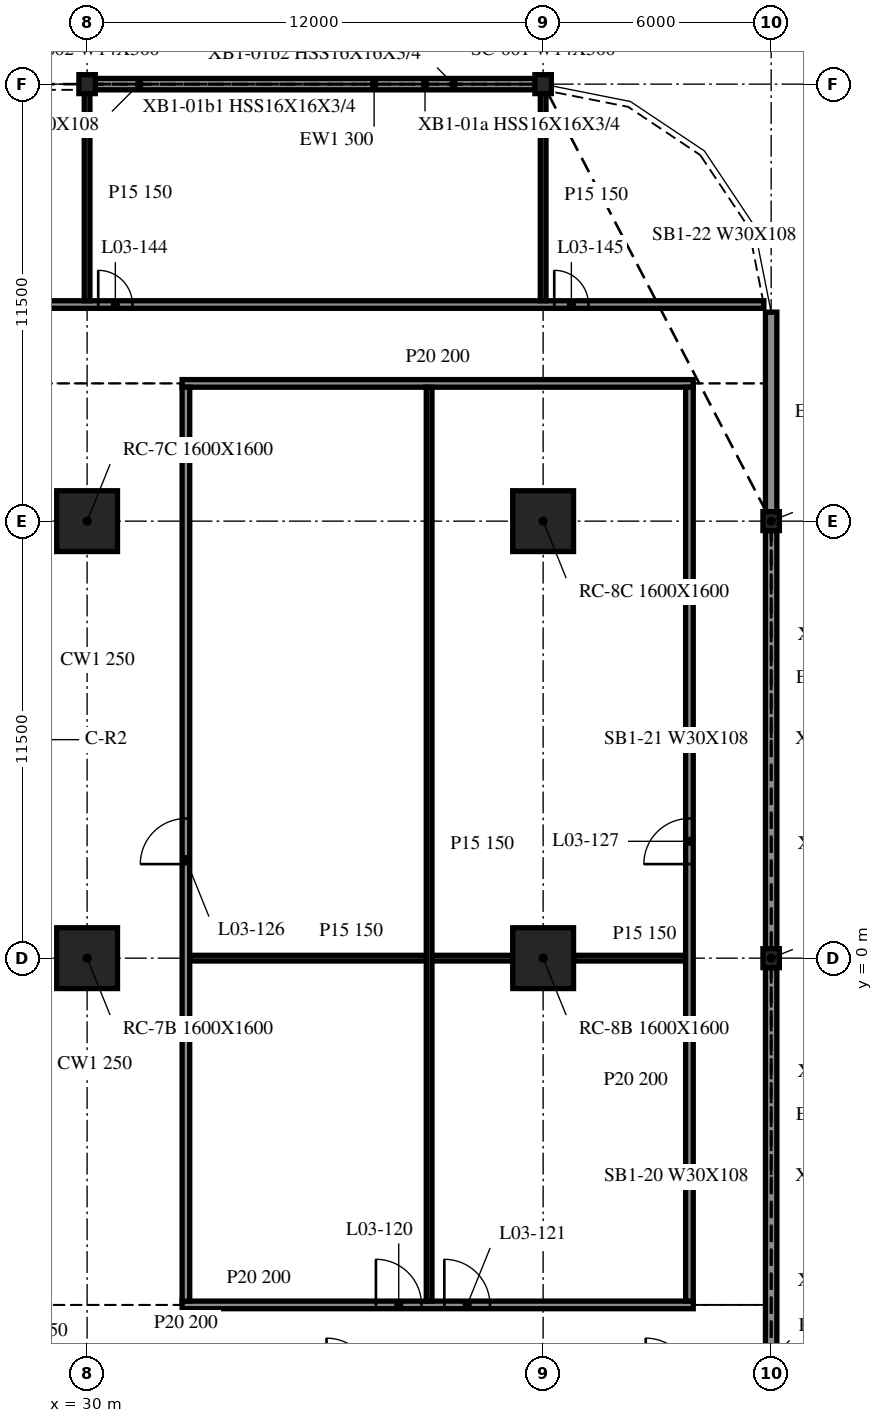
"""IFC4 building model, lengths in metres.
Left out: names, types, materials, properties, quantities, classifications, styles, units other than length and angle.
Written with IfcOpenShell. Run it as: python <this file> out.ifc"""

import sys

from ifc_helpers import new_model, si_unit, direction, frame, frame_2d, origin, origin_2d, place, context, subcontext, project, spatial, rectangle, i_section, extrude, element, fill, save


model = new_model("IFC4")
c1 = context("Model", 3, precision=1e-05, world=origin(), true_north=direction((0.0, 1.0)))
c2 = subcontext(c1, "Body", "Model", "MODEL_VIEW")
j1 = project(units=[si_unit("LENGTHUNIT", "METRE"), si_unit("PLANEANGLEUNIT", "RADIAN")], contexts=[c1])
p1 = place(None, origin())
s1 = spatial("IfcSite", under=j1, at=p1, CompositionType="ELEMENT")
p2 = place(p1, origin())
s2 = spatial("IfcBuilding", under=s1, at=p2, CompositionType="ELEMENT")
p3 = place(p2, frame((0.0, 0.0, 15.8)))
s3 = spatial("IfcBuildingStorey", under=s2, at=p3, CompositionType="ELEMENT", Elevation=15.8)
for number, where, z_axis, x_axis in (
    (1, (30.0, 0.0, -0.34), (0.0, 0.0, 1.0), (1.0, 0.0, 0.0)),
    (2, (30.0, 11.5, -0.34), (0.0, 0.0, 1.0), (1.0, 0.0, 0.0)),
    (3, (42.0, 0.0, -0.34), (0.0, 0.0, 1.0), (1.0, 0.0, 0.0)),
    (4, (42.0, 11.5, -0.34), (0.0, 0.0, 1.0), (1.0, 0.0, 0.0)),
):
    element("IfcColumn", number, at=place(p3, frame(where, z_axis=z_axis, x_axis=x_axis)), inside=s3, PredefinedType="COLUMN", context=c2, shape_type="SweptSolid", body=[
        extrude(rectangle(XDim=1.6, YDim=1.6, at=origin_2d()), origin(), (0.0, 0.0, 1.0), 4.3),
    ])
for number, where, z_axis, x_axis in (
    (5, (42.0, 23.0, -0.34), (0.0, 0.0, 1.0), (1.0, 0.0, 0.0)),
    (6, (30.0, 23.0, -0.34), (0.0, 0.0, 1.0), (1.0, 0.0, 0.0)),
    (7, (48.0, 0.0, -0.34), (0.0, 0.0, 1.0), (1.0, 0.0, 0.0)),
    (8, (48.0, 11.5, -0.34), (0.0, 0.0, 1.0), (1.0, 0.0, 0.0)),
):
    element("IfcColumn", number, at=place(p3, frame(where, z_axis=z_axis, x_axis=x_axis)), inside=s3, PredefinedType="COLUMN", context=c2, shape_type="SweptSolid", body=[
        extrude(i_section(OverallWidth=0.432, OverallDepth=0.498, WebThickness=0.056, FlangeThickness=0.089, at=origin_2d()), origin(), (0.0, 0.0, 1.0), 4.3),
    ])
p4 = place(p3, frame((41.972, 23.0, 0.0), z_axis=(0.0, 0.0, 1.0), x_axis=(-1.0, 0.0, 0.0)))
e9 = element("IfcWall", 9, at=p4, inside=s3, PredefinedType="NOTDEFINED", context=c2, shape_type="SweptSolid", body=[
    extrude(rectangle(XDim=11.944, YDim=0.3, at=frame_2d((5.972, 0.0))), origin(), (0.0, 0.0, 1.0), 3.203),
])
for number, where, z_axis, x_axis in (
    (10, (48.0, -11.251, 0.0), (0.0, 0.0, 1.0), (0.0, 1.0, 0.0)),
    (11, (48.0, 0.249, 0.0), (0.0, 0.0, 1.0), (0.0, 1.0, 0.0)),
):
    element("IfcWall", number, at=place(p3, frame(where, z_axis=z_axis, x_axis=x_axis)), inside=s3, PredefinedType="NOTDEFINED", context=c2, shape_type="SweptSolid", body=[
        extrude(rectangle(XDim=11.002, YDim=0.3, at=frame_2d((5.501, 0.0))), origin(), (0.0, 0.0, 1.0), 3.203),
    ])
p5 = place(p3, frame((48.0, 11.749, 0.0), z_axis=(0.0, 0.0, 1.0), x_axis=(0.0, 1.0, 0.0)))
e12 = element("IfcWall", 12, at=p5, inside=s3, PredefinedType="NOTDEFINED", context=c2, shape_type="SweptSolid", body=[
    extrude(rectangle(XDim=5.251, YDim=0.3, at=frame_2d((2.625, 0.0))), origin(), (0.0, 0.0, 1.0), 3.203),
])
p6 = place(p3, frame((32.5, -9.125, 0.0), z_axis=(0.0, 0.0, 1.0), x_axis=(1.0, 0.0, 0.0)))
e13 = element("IfcWall", 13, at=p6, inside=s3, PredefinedType="PARTITIONING", context=c2, shape_type="SweptSolid", body=[
    extrude(rectangle(XDim=13.45, YDim=0.2, at=frame_2d((6.725, 0.0))), origin(), (0.0, 0.0, 1.0), 3.96),
])
p7 = place(p6, frame((5.1, 0.0, 0.0)))
e14 = element("IfcOpeningElement", 14, at=p7, cuts=e13, PredefinedType="OPENING", context=c2, shape_type="SweptSolid", body=[
    extrude(rectangle(XDim=1.2, YDim=2.1, at=frame_2d((0.6, 1.05))), frame((0.0, 0.11, 0.0), z_axis=(0.0, -1.0, 0.0), x_axis=(1.0, 0.0, 0.0)), (0.0, 0.0, 1.0), 0.22),
])
p8 = place(p6, frame((6.9, 0.0, 0.0)))
e15 = element("IfcOpeningElement", 15, at=p8, cuts=e13, PredefinedType="OPENING", context=c2, shape_type="SweptSolid", body=[
    extrude(rectangle(XDim=1.2, YDim=2.1, at=frame_2d((0.6, 1.05))), frame((0.0, 0.11, 0.0), z_axis=(0.0, -1.0, 0.0), x_axis=(1.0, 0.0, 0.0)), (0.0, 0.0, 1.0), 0.22),
])
p9 = place(p3, frame((32.7, 0.0, 0.0), z_axis=(0.0, 0.0, 1.0), x_axis=(1.0, 0.0, 0.0)))
e16 = element("IfcWall", 16, at=p9, inside=s3, PredefinedType="PARTITIONING", context=c2, shape_type="SweptSolid", body=[
    extrude(rectangle(XDim=8.5, YDim=0.15, at=frame_2d((4.25, 0.0))), origin(), (0.0, 0.0, 1.0), 3.96),
])
p10 = place(p3, frame((42.8, 0.0, 0.0), z_axis=(0.0, 0.0, 1.0), x_axis=(1.0, 0.0, 0.0)))
e17 = element("IfcWall", 17, at=p10, inside=s3, PredefinedType="PARTITIONING", context=c2, shape_type="SweptSolid", body=[
    extrude(rectangle(XDim=2.95, YDim=0.15, at=frame_2d((1.475, 0.0))), origin(), (0.0, 0.0, 1.0), 3.96),
])
p11 = place(p3, frame((32.5, 15.125, 0.0), z_axis=(0.0, 0.0, 1.0), x_axis=(1.0, 0.0, 0.0)))
e18 = element("IfcWall", 18, at=p11, inside=s3, PredefinedType="PARTITIONING", context=c2, shape_type="SweptSolid", body=[
    extrude(rectangle(XDim=13.45, YDim=0.2, at=frame_2d((6.725, 0.0))), origin(), (0.0, 0.0, 1.0), 3.96),
])
p12 = place(p3, frame((-47.807, 17.2, 0.0), z_axis=(0.0, 0.0, 1.0), x_axis=(1.0, 0.0, 0.0)))
e19 = element("IfcWall", 19, at=p12, inside=s3, PredefinedType="PARTITIONING", context=c2, shape_type="SweptSolid", body=[
    extrude(rectangle(XDim=95.615, YDim=0.2, at=frame_2d((47.807, 0.0))), origin(), (0.0, 0.0, 1.0), 3.96),
])
p13 = place(p12, frame((4.7, 0.0, 0.0)))
e20 = element("IfcOpeningElement", 20, at=p13, cuts=e19, PredefinedType="OPENING", context=c2, shape_type="SweptSolid", body=[
    extrude(rectangle(XDim=0.9, YDim=2.1, at=frame_2d((0.45, 1.05))), frame((0.0, 0.11, 0.0), z_axis=(0.0, -1.0, 0.0), x_axis=(1.0, 0.0, 0.0)), (0.0, 0.0, 1.0), 0.22),
])
p14 = place(p12, frame((16.7, 0.0, 0.0)))
e21 = element("IfcOpeningElement", 21, at=p14, cuts=e19, PredefinedType="OPENING", context=c2, shape_type="SweptSolid", body=[
    extrude(rectangle(XDim=0.9, YDim=2.1, at=frame_2d((0.45, 1.05))), frame((0.0, 0.11, 0.0), z_axis=(0.0, -1.0, 0.0), x_axis=(1.0, 0.0, 0.0)), (0.0, 0.0, 1.0), 0.22),
])
p15 = place(p12, frame((20.1, 0.0, 0.0)))
e22 = element("IfcOpeningElement", 22, at=p15, cuts=e19, PredefinedType="OPENING", context=c2, shape_type="SweptSolid", body=[
    extrude(rectangle(XDim=0.9, YDim=2.1, at=frame_2d((0.45, 1.05))), frame((0.0, 0.11, 0.0), z_axis=(0.0, -1.0, 0.0), x_axis=(1.0, 0.0, 0.0)), (0.0, 0.0, 1.0), 0.22),
])
p16 = place(p12, frame((22.7, 0.0, 0.0)))
e23 = element("IfcOpeningElement", 23, at=p16, cuts=e19, PredefinedType="OPENING", context=c2, shape_type="SweptSolid", body=[
    extrude(rectangle(XDim=0.9, YDim=2.1, at=frame_2d((0.45, 1.05))), frame((0.0, 0.11, 0.0), z_axis=(0.0, -1.0, 0.0), x_axis=(1.0, 0.0, 0.0)), (0.0, 0.0, 1.0), 0.22),
])
p17 = place(p12, frame((28.7, 0.0, 0.0)))
e24 = element("IfcOpeningElement", 24, at=p17, cuts=e19, PredefinedType="OPENING", context=c2, shape_type="SweptSolid", body=[
    extrude(rectangle(XDim=0.9, YDim=2.1, at=frame_2d((0.45, 1.05))), frame((0.0, 0.11, 0.0), z_axis=(0.0, -1.0, 0.0), x_axis=(1.0, 0.0, 0.0)), (0.0, 0.0, 1.0), 0.22),
])
p18 = place(p12, frame((40.7, 0.0, 0.0)))
e25 = element("IfcOpeningElement", 25, at=p18, cuts=e19, PredefinedType="OPENING", context=c2, shape_type="SweptSolid", body=[
    extrude(rectangle(XDim=0.9, YDim=2.1, at=frame_2d((0.45, 1.05))), frame((0.0, 0.11, 0.0), z_axis=(0.0, -1.0, 0.0), x_axis=(1.0, 0.0, 0.0)), (0.0, 0.0, 1.0), 0.22),
])
p19 = place(p12, frame((44.1, 0.0, 0.0)))
e26 = element("IfcOpeningElement", 26, at=p19, cuts=e19, PredefinedType="OPENING", context=c2, shape_type="SweptSolid", body=[
    extrude(rectangle(XDim=0.9, YDim=2.1, at=frame_2d((0.45, 1.05))), frame((0.0, 0.11, 0.0), z_axis=(0.0, -1.0, 0.0), x_axis=(1.0, 0.0, 0.0)), (0.0, 0.0, 1.0), 0.22),
])
p20 = place(p12, frame((46.7, 0.0, 0.0)))
e27 = element("IfcOpeningElement", 27, at=p20, cuts=e19, PredefinedType="OPENING", context=c2, shape_type="SweptSolid", body=[
    extrude(rectangle(XDim=0.9, YDim=2.1, at=frame_2d((0.45, 1.05))), frame((0.0, 0.11, 0.0), z_axis=(0.0, -1.0, 0.0), x_axis=(1.0, 0.0, 0.0)), (0.0, 0.0, 1.0), 0.22),
])
p21 = place(p12, frame((48.1, 0.0, 0.0)))
e28 = element("IfcOpeningElement", 28, at=p21, cuts=e19, PredefinedType="OPENING", context=c2, shape_type="SweptSolid", body=[
    extrude(rectangle(XDim=0.9, YDim=2.1, at=frame_2d((0.45, 1.05))), frame((0.0, 0.11, 0.0), z_axis=(0.0, -1.0, 0.0), x_axis=(1.0, 0.0, 0.0)), (0.0, 0.0, 1.0), 0.22),
])
p22 = place(p12, frame((54.1, 0.0, 0.0)))
e29 = element("IfcOpeningElement", 29, at=p22, cuts=e19, PredefinedType="OPENING", context=c2, shape_type="SweptSolid", body=[
    extrude(rectangle(XDim=0.9, YDim=2.1, at=frame_2d((0.45, 1.05))), frame((0.0, 0.11, 0.0), z_axis=(0.0, -1.0, 0.0), x_axis=(1.0, 0.0, 0.0)), (0.0, 0.0, 1.0), 0.22),
])
p23 = place(p12, frame((66.1, 0.0, 0.0)))
e30 = element("IfcOpeningElement", 30, at=p23, cuts=e19, PredefinedType="OPENING", context=c2, shape_type="SweptSolid", body=[
    extrude(rectangle(XDim=0.9, YDim=2.1, at=frame_2d((0.45, 1.05))), frame((0.0, 0.11, 0.0), z_axis=(0.0, -1.0, 0.0), x_axis=(1.0, 0.0, 0.0)), (0.0, 0.0, 1.0), 0.22),
])
p24 = place(p12, frame((69.5, 0.0, 0.0)))
e31 = element("IfcOpeningElement", 31, at=p24, cuts=e19, PredefinedType="OPENING", context=c2, shape_type="SweptSolid", body=[
    extrude(rectangle(XDim=0.9, YDim=2.1, at=frame_2d((0.45, 1.05))), frame((0.0, 0.11, 0.0), z_axis=(0.0, -1.0, 0.0), x_axis=(1.0, 0.0, 0.0)), (0.0, 0.0, 1.0), 0.22),
])
p25 = place(p12, frame((72.1, 0.0, 0.0)))
e32 = element("IfcOpeningElement", 32, at=p25, cuts=e19, PredefinedType="OPENING", context=c2, shape_type="SweptSolid", body=[
    extrude(rectangle(XDim=0.9, YDim=2.1, at=frame_2d((0.45, 1.05))), frame((0.0, 0.11, 0.0), z_axis=(0.0, -1.0, 0.0), x_axis=(1.0, 0.0, 0.0)), (0.0, 0.0, 1.0), 0.22),
])
p26 = place(p12, frame((78.1, 0.0, 0.0)))
e33 = element("IfcOpeningElement", 33, at=p26, cuts=e19, PredefinedType="OPENING", context=c2, shape_type="SweptSolid", body=[
    extrude(rectangle(XDim=0.9, YDim=2.1, at=frame_2d((0.45, 1.05))), frame((0.0, 0.11, 0.0), z_axis=(0.0, -1.0, 0.0), x_axis=(1.0, 0.0, 0.0)), (0.0, 0.0, 1.0), 0.22),
])
p27 = place(p12, frame((90.1, 0.0, 0.0)))
e34 = element("IfcOpeningElement", 34, at=p27, cuts=e19, PredefinedType="OPENING", context=c2, shape_type="SweptSolid", body=[
    extrude(rectangle(XDim=0.9, YDim=2.1, at=frame_2d((0.45, 1.05))), frame((0.0, 0.11, 0.0), z_axis=(0.0, -1.0, 0.0), x_axis=(1.0, 0.0, 0.0)), (0.0, 0.0, 1.0), 0.22),
])
p28 = place(p3, frame((30.0, 17.3, 0.0), z_axis=(0.0, 0.0, 1.0), x_axis=(0.0, 1.0, 0.0)))
e35 = element("IfcWall", 35, at=p28, inside=s3, PredefinedType="PARTITIONING", context=c2, shape_type="SweptSolid", body=[
    extrude(rectangle(XDim=5.675, YDim=0.15, at=frame_2d((2.837, 0.0))), origin(), (0.0, 0.0, 1.0), 3.96),
])
p29 = place(p3, frame((32.6, -9.025, 0.0), z_axis=(0.0, 0.0, 1.0), x_axis=(0.0, 1.0, 0.0)))
e36 = element("IfcWall", 36, at=p29, inside=s3, PredefinedType="PARTITIONING", context=c2, shape_type="SweptSolid", body=[
    extrude(rectangle(XDim=24.05, YDim=0.2, at=frame_2d((12.025, 0.0))), origin(), (0.0, 0.0, 1.0), 3.96),
])
p30 = place(p29, frame((11.5, 0.0, 0.0)))
e37 = element("IfcOpeningElement", 37, at=p30, cuts=e36, PredefinedType="OPENING", context=c2, shape_type="SweptSolid", body=[
    extrude(rectangle(XDim=1.2, YDim=2.1, at=frame_2d((0.6, 1.05))), frame((0.0, 0.11, 0.0), z_axis=(0.0, -1.0, 0.0), x_axis=(1.0, 0.0, 0.0)), (0.0, 0.0, 1.0), 0.22),
])
p31 = place(p3, frame((39.0, -9.025, 0.0), z_axis=(0.0, 0.0, 1.0), x_axis=(0.0, 1.0, 0.0)))
e38 = element("IfcWall", 38, at=p31, inside=s3, PredefinedType="PARTITIONING", context=c2, shape_type="SweptSolid", body=[
    extrude(rectangle(XDim=24.05, YDim=0.15, at=frame_2d((12.025, 0.0))), origin(), (0.0, 0.0, 1.0), 3.96),
])
p32 = place(p3, frame((42.0, 17.3, 0.0), z_axis=(0.0, 0.0, 1.0), x_axis=(0.0, 1.0, 0.0)))
e39 = element("IfcWall", 39, at=p32, inside=s3, PredefinedType="PARTITIONING", context=c2, shape_type="SweptSolid", body=[
    extrude(rectangle(XDim=5.547, YDim=0.15, at=frame_2d((2.773, 0.0))), origin(), (0.0, 0.0, 1.0), 3.96),
])
p33 = place(p3, frame((45.85, -9.025, 0.0), z_axis=(0.0, 0.0, 1.0), x_axis=(0.0, 1.0, 0.0)))
e40 = element("IfcWall", 40, at=p33, inside=s3, PredefinedType="PARTITIONING", context=c2, shape_type="SweptSolid", body=[
    extrude(rectangle(XDim=24.05, YDim=0.2, at=frame_2d((12.025, 0.0))), origin(), (0.0, 0.0, 1.0), 3.96),
])
p34 = place(p33, frame((11.5, 0.0, 0.0)))
e41 = element("IfcOpeningElement", 41, at=p34, cuts=e40, PredefinedType="OPENING", context=c2, shape_type="SweptSolid", body=[
    extrude(rectangle(XDim=1.2, YDim=2.1, at=frame_2d((0.6, 1.05))), frame((0.0, 0.11, 0.0), z_axis=(0.0, -1.0, 0.0), x_axis=(1.0, 0.0, 0.0)), (0.0, 0.0, 1.0), 0.22),
])
p35 = place(p7, origin())
e42 = element("IfcDoor", 42, at=p35, inside=s3, OperationType="SINGLE_SWING_LEFT", PredefinedType="DOOR", context=c2, shape_type="SweptSolid", body=[
    extrude(rectangle(XDim=1.2, YDim=2.1, at=frame_2d((0.6, 1.05))), frame((0.0, 0.025, 0.0), z_axis=(0.0, -1.0, 0.0), x_axis=(1.0, 0.0, 0.0)), (0.0, 0.0, 1.0), 0.05),
])
fill(e14, e42)
p36 = place(p8, origin())
e43 = element("IfcDoor", 43, at=p36, inside=s3, OperationType="SINGLE_SWING_RIGHT", PredefinedType="DOOR", context=c2, shape_type="SweptSolid", body=[
    extrude(rectangle(XDim=1.2, YDim=2.1, at=frame_2d((0.6, 1.05))), frame((0.0, 0.025, 0.0), z_axis=(0.0, -1.0, 0.0), x_axis=(1.0, 0.0, 0.0)), (0.0, 0.0, 1.0), 0.05),
])
fill(e15, e43)
p37 = place(p30, origin())
e44 = element("IfcDoor", 44, at=p37, inside=s3, OperationType="SINGLE_SWING_LEFT", PredefinedType="DOOR", context=c2, shape_type="SweptSolid", body=[
    extrude(rectangle(XDim=1.2, YDim=2.1, at=frame_2d((0.6, 1.05))), frame((0.0, 0.025, 0.0), z_axis=(0.0, -1.0, 0.0), x_axis=(1.0, 0.0, 0.0)), (0.0, 0.0, 1.0), 0.05),
])
fill(e37, e44)
p38 = place(p34, origin())
e45 = element("IfcDoor", 45, at=p38, inside=s3, OperationType="SINGLE_SWING_RIGHT", PredefinedType="DOOR", context=c2, shape_type="SweptSolid", body=[
    extrude(rectangle(XDim=1.2, YDim=2.1, at=frame_2d((0.6, 1.05))), frame((0.0, 0.025, 0.0), z_axis=(0.0, -1.0, 0.0), x_axis=(1.0, 0.0, 0.0)), (0.0, 0.0, 1.0), 0.05),
])
fill(e41, e45)
p39 = place(p26, origin())
e46 = element("IfcDoor", 46, at=p39, inside=s3, OperationType="SINGLE_SWING_RIGHT", PredefinedType="DOOR", context=c2, shape_type="SweptSolid", body=[
    extrude(rectangle(XDim=0.9, YDim=2.1, at=frame_2d((0.45, 1.05))), frame((0.0, 0.025, 0.0), z_axis=(0.0, -1.0, 0.0), x_axis=(1.0, 0.0, 0.0)), (0.0, 0.0, 1.0), 0.05),
])
fill(e33, e46)
p40 = place(p27, origin())
e47 = element("IfcDoor", 47, at=p40, inside=s3, OperationType="SINGLE_SWING_RIGHT", PredefinedType="DOOR", context=c2, shape_type="SweptSolid", body=[
    extrude(rectangle(XDim=0.9, YDim=2.1, at=frame_2d((0.45, 1.05))), frame((0.0, 0.025, 0.0), z_axis=(0.0, -1.0, 0.0), x_axis=(1.0, 0.0, 0.0)), (0.0, 0.0, 1.0), 0.05),
])
fill(e34, e47)
save(model, sys.argv[1])
